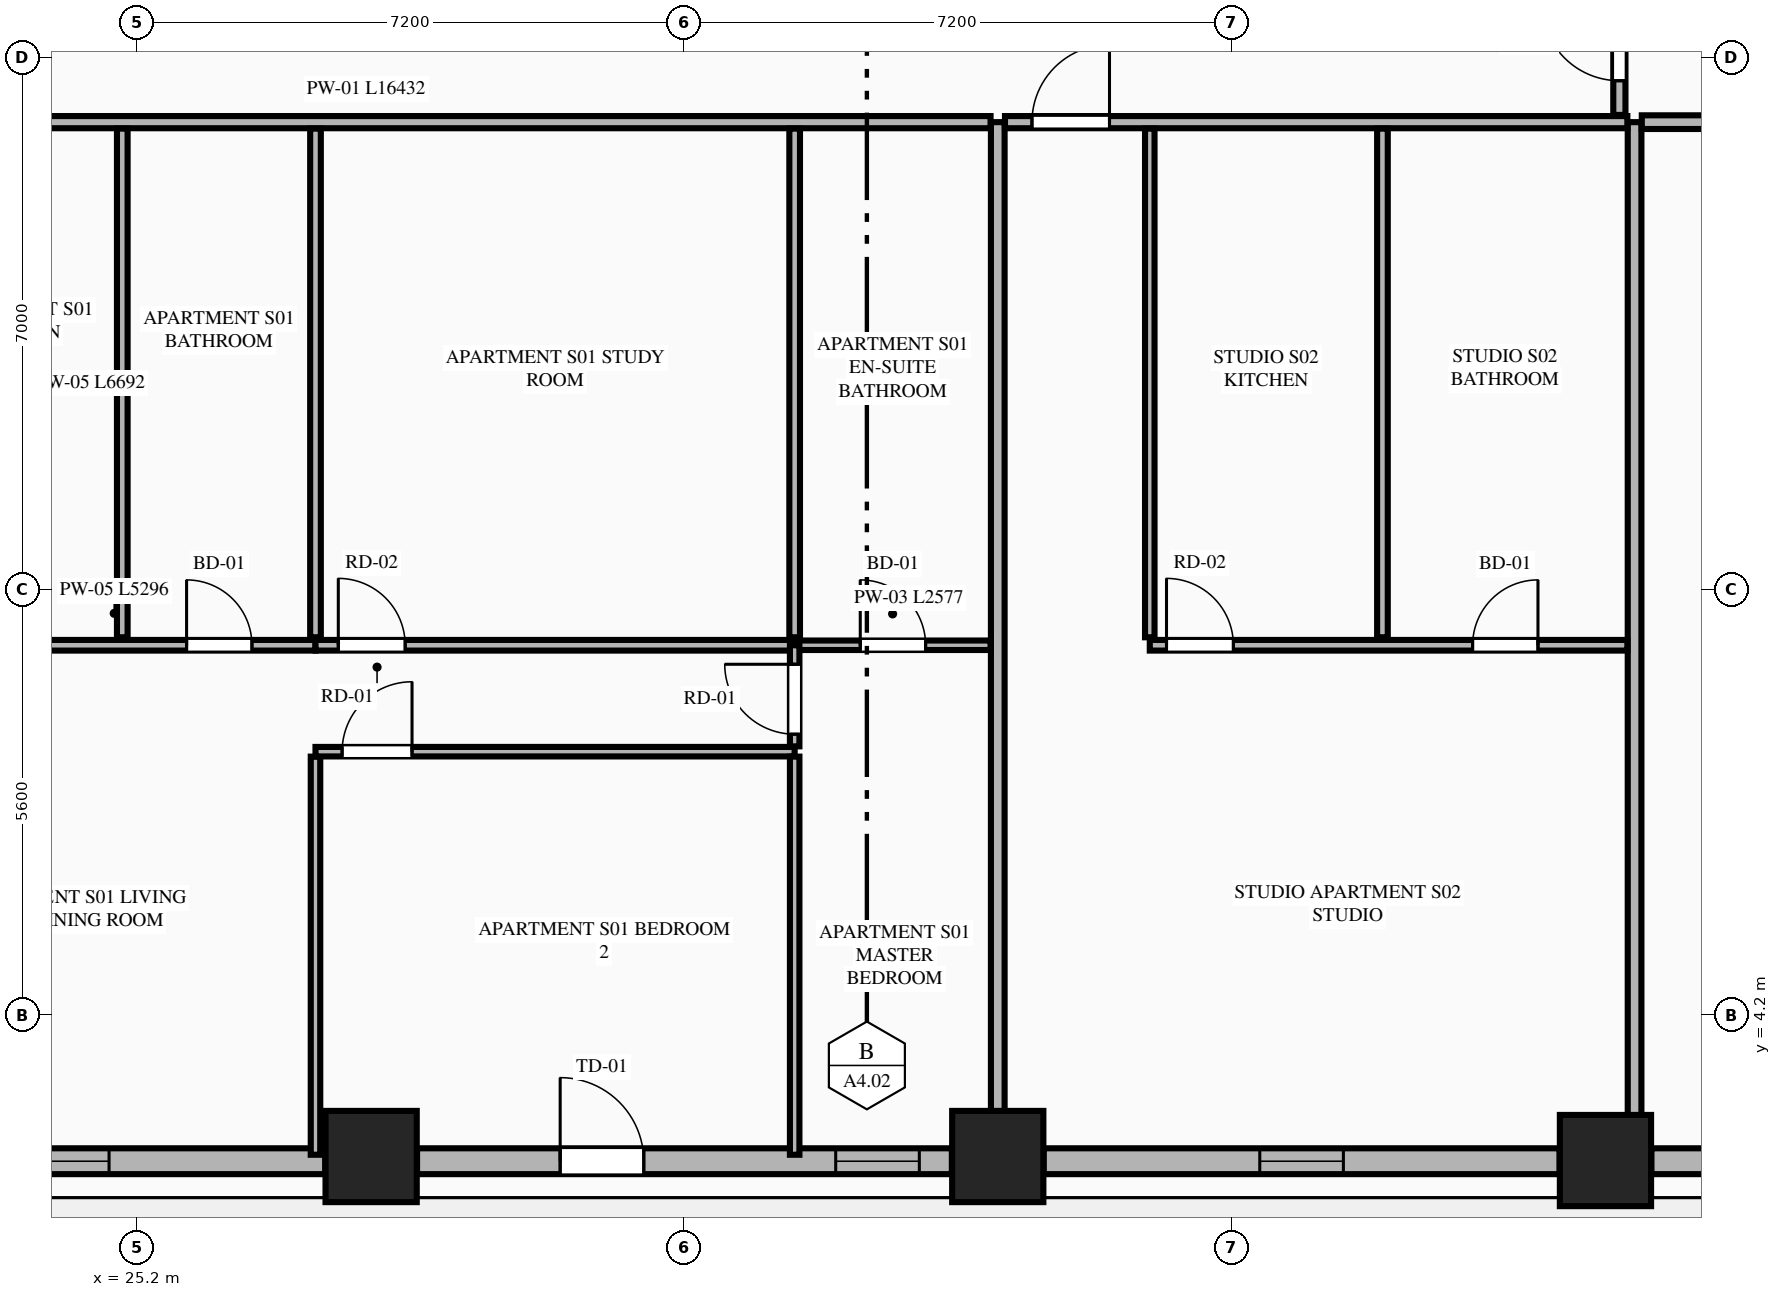
"""IFC4 building model, lengths in metres.
Left out: names, types, materials, properties, quantities, classifications, styles, units other than length and angle.
Written with IfcOpenShell. Run it as: python <this file> out.ifc"""

import sys

from ifc_helpers import new_model, si_unit, direction, frame, frame_2d, origin, origin_2d, place, context, subcontext, project, spatial, rectangle, extrude, element, fill, save


model = new_model("IFC4")
c1 = context("Model", 3, precision=1e-05, world=origin(), true_north=direction((0.0, 1.0)))
c2 = subcontext(c1, "Body", "Model", "MODEL_VIEW")
j1 = project(units=[si_unit("LENGTHUNIT", "METRE"), si_unit("PLANEANGLEUNIT", "RADIAN")], contexts=[c1])
p1 = place(None, origin())
s1 = spatial("IfcSite", under=j1, at=p1, CompositionType="ELEMENT")
p2 = place(p1, origin())
s2 = spatial("IfcBuilding", under=s1, at=p2, CompositionType="ELEMENT")
p3 = place(p2, frame((0.0, 0.0, 53.3)))
s3 = spatial("IfcBuildingStorey", under=s2, at=p3, CompositionType="ELEMENT", Elevation=53.3)
for number, where, z_axis, x_axis in (
    (1, (28.278, 2.342, 0.0), (0.0, 0.0, 1.0), (1.0, 0.0, 0.0)),
    (2, (36.522, 2.342, 0.0), (0.0, 0.0, 1.0), (1.0, 0.0, 0.0)),
    (3, (44.517, 2.289, 0.0), (0.0, 0.0, 1.0), (1.0, 0.0, 0.0)),
):
    element("IfcColumn", number, at=place(p3, frame(where, z_axis=z_axis, x_axis=x_axis)), inside=s3, PredefinedType="COLUMN", context=c2, shape_type="SweptSolid", body=[
        extrude(rectangle(XDim=1.2, YDim=1.2, at=origin_2d()), origin(), (0.0, 0.0, 1.0), 3.55),
    ])
p4 = place(p3, frame((20.887, 2.28, 0.0), z_axis=(0.0, 0.0, 1.0), x_axis=(1.0, 0.0, 0.0)))
e4 = element("IfcWall", 4, at=p4, inside=s3, PredefinedType="STANDARD", context=c2, shape_type="SweptSolid", body=[
    extrude(rectangle(XDim=6.787, YDim=0.34, at=frame_2d((3.394, 0.0))), origin(), (0.0, 0.0, 1.0), 2.787),
])
p5 = place(p4, frame((2.843, 0.0, 0.75)))
e5 = element("IfcOpeningElement", 5, at=p5, cuts=e4, PredefinedType="OPENING", context=c2, shape_type="SweptSolid", body=[
    extrude(rectangle(XDim=1.1, YDim=1.887, at=frame_2d((0.55, 0.943))), frame((0.0, 0.18, 0.0), z_axis=(0.0, -1.0, 0.0), x_axis=(1.0, 0.0, 0.0)), (0.0, 0.0, 1.0), 0.36),
])
p6 = place(p3, frame((28.882, 2.28, 0.0), z_axis=(0.0, 0.0, 1.0), x_axis=(1.0, 0.0, 0.0)))
e6 = element("IfcWall", 6, at=p6, inside=s3, PredefinedType="STANDARD", context=c2, shape_type="SweptSolid", body=[
    extrude(rectangle(XDim=7.036, YDim=0.34, at=frame_2d((3.518, 0.0))), origin(), (0.0, 0.0, 1.0), 2.787),
])
p7 = place(p6, frame((1.883, 0.0, 0.0)))
e7 = element("IfcOpeningElement", 7, at=p7, cuts=e6, PredefinedType="OPENING", context=c2, shape_type="SweptSolid", body=[
    extrude(rectangle(XDim=1.1, YDim=2.25, at=frame_2d((0.55, 1.125))), frame((0.0, 0.18, 0.0), z_axis=(0.0, -1.0, 0.0), x_axis=(1.0, 0.0, 0.0)), (0.0, 0.0, 1.0), 0.36),
])
p8 = place(p6, frame((5.508, 0.0, 0.75)))
e8 = element("IfcOpeningElement", 8, at=p8, cuts=e6, PredefinedType="OPENING", context=c2, shape_type="SweptSolid", body=[
    extrude(rectangle(XDim=1.1, YDim=1.887, at=frame_2d((0.55, 0.943))), frame((0.0, 0.18, 0.0), z_axis=(0.0, -1.0, 0.0), x_axis=(1.0, 0.0, 0.0)), (0.0, 0.0, 1.0), 0.36),
])
p9 = place(p3, frame((37.126, 2.28, 0.0), z_axis=(0.0, 0.0, 1.0), x_axis=(1.0, 0.0, 0.0)))
e9 = element("IfcWall", 9, at=p9, inside=s3, PredefinedType="STANDARD", context=c2, shape_type="SweptSolid", body=[
    extrude(rectangle(XDim=6.787, YDim=0.34, at=frame_2d((3.394, 0.0))), origin(), (0.0, 0.0, 1.0), 2.787),
])
p10 = place(p9, frame((2.843, 0.0, 0.75)))
e10 = element("IfcOpeningElement", 10, at=p10, cuts=e9, PredefinedType="OPENING", context=c2, shape_type="SweptSolid", body=[
    extrude(rectangle(XDim=1.1, YDim=1.887, at=frame_2d((0.55, 0.943))), frame((0.0, 0.18, 0.0), z_axis=(0.0, -1.0, 0.0), x_axis=(1.0, 0.0, 0.0)), (0.0, 0.0, 1.0), 0.36),
])
p11 = place(p3, frame((45.121, 2.28, 0.0), z_axis=(0.0, 0.0, 1.0), x_axis=(1.0, 0.0, 0.0)))
e11 = element("IfcWall", 11, at=p11, inside=s3, PredefinedType="STANDARD", context=c2, shape_type="SweptSolid", body=[
    extrude(rectangle(XDim=1.245, YDim=0.34, at=frame_2d((0.623, 0.0))), origin(), (0.0, 0.0, 1.0), 3.33),
])
p12 = place(p3, frame((36.522, 2.455, 0.0), z_axis=(0.0, 0.0, 1.0), x_axis=(0.0, 1.0, 0.0)))
e12 = element("IfcWall", 12, at=p12, inside=s3, PredefinedType="PARTITIONING", context=c2, shape_type="SweptSolid", body=[
    extrude(rectangle(XDim=13.495, YDim=0.18, at=frame_2d((6.748, 0.0))), origin(), (0.0, 0.0, 1.0), 2.637),
])
p13 = place(p3, frame((44.9, 2.455, 0.0), z_axis=(0.0, 0.0, 1.0), x_axis=(0.0, 1.0, 0.0)))
e13 = element("IfcWall", 13, at=p13, inside=s3, PredefinedType="PARTITIONING", context=c2, shape_type="SweptSolid", body=[
    extrude(rectangle(XDim=13.495, YDim=0.18, at=frame_2d((6.748, 0.0))), origin(), (0.0, 0.0, 1.0), 3.33),
])
p14 = place(p3, frame((19.995, 15.95, 0.0), z_axis=(0.0, 0.0, 1.0), x_axis=(1.0, 0.0, 0.0)))
e14 = element("IfcWall", 14, at=p14, inside=s3, PredefinedType="PARTITIONING", context=c2, shape_type="SweptSolid", body=[
    extrude(rectangle(XDim=16.432, YDim=0.16, at=frame_2d((8.216, 0.0))), origin(), (0.0, 0.0, 1.0), 3.33),
])
p15 = place(p14, frame((0.705, 0.0, 0.0)))
e15 = element("IfcOpeningElement", 15, at=p15, cuts=e14, PredefinedType="OPENING", context=c2, shape_type="SweptSolid", body=[
    extrude(rectangle(XDim=1.35, YDim=2.35, at=frame_2d((0.675, 1.175))), frame((0.0, 0.09, 0.0), z_axis=(0.0, -1.0, 0.0), x_axis=(1.0, 0.0, 0.0)), (0.0, 0.0, 1.0), 0.18),
])
p16 = place(p3, frame((22.25, 9.068, 0.0), z_axis=(0.0, 0.0, 1.0), x_axis=(1.0, 0.0, 0.0)))
e16 = element("IfcWall", 16, at=p16, inside=s3, PredefinedType="PLUMBINGWALL", context=c2, shape_type="SweptSolid", body=[
    extrude(rectangle(XDim=5.296, YDim=0.14, at=frame_2d((2.648, 0.0))), origin(), (0.0, 0.0, 1.0), 3.33),
])
p17 = place(p16, frame((3.6, 0.0, 0.0)))
e17 = element("IfcOpeningElement", 17, at=p17, cuts=e16, PredefinedType="OPENING", context=c2, shape_type="SweptSolid", body=[
    extrude(rectangle(XDim=0.86, YDim=2.1, at=frame_2d((0.43, 1.05))), frame((0.0, 0.08, 0.0), z_axis=(0.0, -1.0, 0.0), x_axis=(1.0, 0.0, 0.0)), (0.0, 0.0, 1.0), 0.16),
])
p18 = place(p16, frame((0.26, 0.0, 0.0)))
e18 = element("IfcOpeningElement", 18, at=p18, cuts=e16, PredefinedType="OPENING", context=c2, shape_type="SweptSolid", body=[
    extrude(rectangle(XDim=0.88, YDim=2.15, at=frame_2d((0.44, 1.075))), frame((0.0, 0.08, 0.0), z_axis=(0.0, -1.0, 0.0), x_axis=(1.0, 0.0, 0.0)), (0.0, 0.0, 1.0), 0.16),
])
p19 = place(p3, frame((27.546, 9.068, 0.0), z_axis=(0.0, 0.0, 1.0), x_axis=(1.0, 0.0, 0.0)))
e19 = element("IfcWall", 19, at=p19, inside=s3, PredefinedType="PLUMBINGWALL", context=c2, shape_type="SweptSolid", body=[
    extrude(rectangle(XDim=6.304, YDim=0.14, at=frame_2d((3.152, 0.0))), origin(), (0.0, 0.0, 1.0), 3.33),
])
p20 = place(p19, frame((0.3, 0.0, 0.0)))
e20 = element("IfcOpeningElement", 20, at=p20, cuts=e19, PredefinedType="OPENING", context=c2, shape_type="SweptSolid", body=[
    extrude(rectangle(XDim=0.88, YDim=2.15, at=frame_2d((0.44, 1.075))), frame((0.0, 0.08, 0.0), z_axis=(0.0, -1.0, 0.0), x_axis=(1.0, 0.0, 0.0)), (0.0, 0.0, 1.0), 0.16),
])
p21 = place(p3, frame((33.85, 9.068, 0.0), z_axis=(0.0, 0.0, 1.0), x_axis=(1.0, 0.0, 0.0)))
e21 = element("IfcWall", 21, at=p21, inside=s3, PredefinedType="PARTITIONING", context=c2, shape_type="SweptSolid", body=[
    extrude(rectangle(XDim=2.577, YDim=0.125, at=frame_2d((1.289, 0.0))), origin(), (0.0, 0.0, 1.0), 3.33),
])
p22 = place(p21, frame((0.863, 0.0, 0.0)))
e22 = element("IfcOpeningElement", 22, at=p22, cuts=e21, PredefinedType="OPENING", context=c2, shape_type="SweptSolid", body=[
    extrude(rectangle(XDim=0.86, YDim=2.1, at=frame_2d((0.43, 1.05))), frame((0.0, 0.073, 0.0), z_axis=(0.0, -1.0, 0.0), x_axis=(1.0, 0.0, 0.0)), (0.0, 0.0, 1.0), 0.145),
])
p23 = place(p3, frame((25.004, 9.173, 0.0), z_axis=(0.0, 0.0, 1.0), x_axis=(0.0, 1.0, 0.0)))
e23 = element("IfcWall", 23, at=p23, inside=s3, PredefinedType="PLUMBINGWALL", context=c2, shape_type="SweptSolid", body=[
    extrude(rectangle(XDim=6.692, YDim=0.14, at=frame_2d((3.346, 0.0))), origin(), (0.0, 0.0, 1.0), 3.33),
])
p24 = place(p3, frame((27.546, 2.365, 0.0), z_axis=(0.0, 0.0, 1.0), x_axis=(0.0, 1.0, 0.0)))
e24 = element("IfcWall", 24, at=p24, inside=s3, PredefinedType="PARTITIONING", context=c2, shape_type="SweptSolid", body=[
    extrude(rectangle(XDim=5.238, YDim=0.125, at=frame_2d((2.619, 0.0))), origin(), (0.0, 0.0, 1.0), 3.33),
])
p25 = place(p3, frame((27.546, 7.668, 0.0), z_axis=(0.0, 0.0, 1.0), x_axis=(1.0, 0.0, 0.0)))
e25 = element("IfcWall", 25, at=p25, inside=s3, PredefinedType="PARTITIONING", context=c2, shape_type="SweptSolid", body=[
    extrude(rectangle(XDim=6.304, YDim=0.125, at=frame_2d((3.152, 0.0))), origin(), (0.0, 0.0, 1.0), 3.33),
])
p26 = place(p25, frame((0.35, 0.0, 0.0)))
e26 = element("IfcOpeningElement", 26, at=p26, cuts=e25, PredefinedType="OPENING", context=c2, shape_type="SweptSolid", body=[
    extrude(rectangle(XDim=0.92, YDim=2.15, at=frame_2d((0.46, 1.075))), frame((0.0, 0.073, 0.0), z_axis=(0.0, -1.0, 0.0), x_axis=(1.0, 0.0, 0.0)), (0.0, 0.0, 1.0), 0.145),
])
p27 = place(p3, frame((33.85, 7.738, 0.0), z_axis=(0.0, 0.0, 1.0), x_axis=(0.0, 1.0, 0.0)))
e27 = element("IfcWall", 27, at=p27, inside=s3, PredefinedType="PARTITIONING", context=c2, shape_type="SweptSolid", body=[
    extrude(rectangle(XDim=1.33, YDim=0.125, at=frame_2d((0.665, 0.0))), origin(), (0.0, 0.0, 1.0), 3.33),
])
p28 = place(p27, frame((0.16, 0.0, 0.0)))
e28 = element("IfcOpeningElement", 28, at=p28, cuts=e27, PredefinedType="OPENING", context=c2, shape_type="SweptSolid", body=[
    extrude(rectangle(XDim=0.92, YDim=2.15, at=frame_2d((0.46, 1.075))), frame((0.0, 0.073, 0.0), z_axis=(0.0, -1.0, 0.0), x_axis=(1.0, 0.0, 0.0)), (0.0, 0.0, 1.0), 0.145),
])
for number, where, z_axis, x_axis in (
    (29, (27.546, 9.173, 0.0), (0.0, 0.0, 1.0), (0.0, 1.0, 0.0)),
    (30, (33.85, 9.173, 0.0), (0.0, 0.0, 1.0), (0.0, 1.0, 0.0)),
):
    element("IfcWall", number, at=place(p3, frame(where, z_axis=z_axis, x_axis=x_axis)), inside=s3, PredefinedType="PLUMBINGWALL", context=c2, shape_type="SweptSolid", body=[
        extrude(rectangle(XDim=6.692, YDim=0.14, at=frame_2d((3.346, 0.0))), origin(), (0.0, 0.0, 1.0), 3.33),
    ])
p29 = place(p3, frame((33.85, 2.365, 0.0), z_axis=(0.0, 0.0, 1.0), x_axis=(0.0, 1.0, 0.0)))
e31 = element("IfcWall", 31, at=p29, inside=s3, PredefinedType="PARTITIONING", context=c2, shape_type="SweptSolid", body=[
    extrude(rectangle(XDim=5.238, YDim=0.125, at=frame_2d((2.619, 0.0))), origin(), (0.0, 0.0, 1.0), 3.33),
])
p30 = place(p3, frame((36.617, 15.95, 0.0), z_axis=(0.0, 0.0, 1.0), x_axis=(1.0, 0.0, 0.0)))
e32 = element("IfcWall", 32, at=p30, inside=s3, PredefinedType="PARTITIONING", context=c2, shape_type="SweptSolid", body=[
    extrude(rectangle(XDim=8.188, YDim=0.16, at=frame_2d((4.094, 0.0))), origin(), (0.0, 0.0, 1.0), 3.33),
])
p31 = place(p30, frame((0.355, 0.0, 0.0)))
e33 = element("IfcOpeningElement", 33, at=p31, cuts=e32, PredefinedType="OPENING", context=c2, shape_type="SweptSolid", body=[
    extrude(rectangle(XDim=1.02, YDim=2.25, at=frame_2d((0.51, 1.125))), frame((0.0, 0.09, 0.0), z_axis=(0.0, -1.0, 0.0), x_axis=(1.0, 0.0, 0.0)), (0.0, 0.0, 1.0), 0.18),
])
p32 = place(p3, frame((38.522, 9.173, 0.0), z_axis=(0.0, 0.0, 1.0), x_axis=(0.0, 1.0, 0.0)))
e34 = element("IfcWall", 34, at=p32, inside=s3, PredefinedType="PARTITIONING", context=c2, shape_type="SweptSolid", body=[
    extrude(rectangle(XDim=6.692, YDim=0.125, at=frame_2d((3.346, 0.0))), origin(), (0.0, 0.0, 1.0), 3.33),
])
p33 = place(p3, frame((38.522, 9.068, 0.0), z_axis=(0.0, 0.0, 1.0), x_axis=(1.0, 0.0, 0.0)))
e35 = element("IfcWall", 35, at=p33, inside=s3, PredefinedType="PLUMBINGWALL", context=c2, shape_type="SweptSolid", body=[
    extrude(rectangle(XDim=6.283, YDim=0.14, at=frame_2d((3.142, 0.0))), origin(), (0.0, 0.0, 1.0), 3.33),
])
p34 = place(p33, frame((4.247, 0.0, 0.0)))
e36 = element("IfcOpeningElement", 36, at=p34, cuts=e35, PredefinedType="OPENING", context=c2, shape_type="SweptSolid", body=[
    extrude(rectangle(XDim=0.86, YDim=2.1, at=frame_2d((0.43, 1.05))), frame((0.0, 0.08, 0.0), z_axis=(0.0, -1.0, 0.0), x_axis=(1.0, 0.0, 0.0)), (0.0, 0.0, 1.0), 0.16),
])
p35 = place(p33, frame((0.22, 0.0, 0.0)))
e37 = element("IfcOpeningElement", 37, at=p35, cuts=e35, PredefinedType="OPENING", context=c2, shape_type="SweptSolid", body=[
    extrude(rectangle(XDim=0.88, YDim=2.15, at=frame_2d((0.44, 1.075))), frame((0.0, 0.08, 0.0), z_axis=(0.0, -1.0, 0.0), x_axis=(1.0, 0.0, 0.0)), (0.0, 0.0, 1.0), 0.16),
])
p36 = place(p3, frame((41.583, 9.173, 0.0), z_axis=(0.0, 0.0, 1.0), x_axis=(0.0, 1.0, 0.0)))
e38 = element("IfcWall", 38, at=p36, inside=s3, PredefinedType="PLUMBINGWALL", context=c2, shape_type="SweptSolid", body=[
    extrude(rectangle(XDim=6.692, YDim=0.14, at=frame_2d((3.346, 0.0))), origin(), (0.0, 0.0, 1.0), 3.33),
])
p37 = place(p3, frame((44.995, 15.95, 0.0), z_axis=(0.0, 0.0, 1.0), x_axis=(1.0, 0.0, 0.0)))
e39 = element("IfcWall", 39, at=p37, inside=s3, PredefinedType="PARTITIONING", context=c2, shape_type="SweptSolid", body=[
    extrude(rectangle(XDim=9.241, YDim=0.18, at=frame_2d((4.621, 0.0))), origin(), (0.0, 0.0, 1.0), 3.33),
])
p38 = place(p3, frame((44.7, 16.045, 0.0), z_axis=(0.0, 0.0, 1.0), x_axis=(0.0, 1.0, 0.0)))
e40 = element("IfcWall", 40, at=p38, inside=s3, PredefinedType="PARTITIONING", context=c2, shape_type="SweptSolid", body=[
    extrude(rectangle(XDim=19.71, YDim=0.16, at=frame_2d((9.855, 0.0))), origin(), (0.0, 0.0, 1.0), 3.33),
])
p39 = place(p38, frame((0.45, 0.0, 0.0)))
e41 = element("IfcOpeningElement", 41, at=p39, cuts=e40, PredefinedType="OPENING", context=c2, shape_type="SweptSolid", body=[
    extrude(rectangle(XDim=1.02, YDim=2.25, at=frame_2d((0.51, 1.125))), frame((0.0, 0.09, 0.0), z_axis=(0.0, -1.0, 0.0), x_axis=(1.0, 0.0, 0.0)), (0.0, 0.0, 1.0), 0.18),
])
p40 = place(p5, origin())
e42 = element("IfcWindow", 42, at=p40, inside=s3, PartitioningType="SINGLE_PANEL", PredefinedType="WINDOW", context=c2, shape_type="SweptSolid", body=[
    extrude(rectangle(XDim=1.1, YDim=1.887, at=frame_2d((0.55, 0.943))), frame((0.0, 0.03, 0.0), z_axis=(0.0, -1.0, 0.0), x_axis=(1.0, 0.0, 0.0)), (0.0, 0.0, 1.0), 0.06),
])
fill(e5, e42)
p41 = place(p7, origin())
e43 = element("IfcDoor", 43, at=p41, inside=s3, OperationType="SINGLE_SWING_LEFT", PredefinedType="DOOR", context=c2, shape_type="SweptSolid", body=[
    extrude(rectangle(XDim=1.1, YDim=2.25, at=frame_2d((0.55, 1.125))), frame((0.0, 0.025, 0.0), z_axis=(0.0, -1.0, 0.0), x_axis=(1.0, 0.0, 0.0)), (0.0, 0.0, 1.0), 0.05),
])
fill(e7, e43)
p42 = place(p10, origin())
e44 = element("IfcWindow", 44, at=p42, inside=s3, PartitioningType="SINGLE_PANEL", PredefinedType="WINDOW", context=c2, shape_type="SweptSolid", body=[
    extrude(rectangle(XDim=1.1, YDim=1.887, at=frame_2d((0.55, 0.943))), frame((0.0, 0.03, 0.0), z_axis=(0.0, -1.0, 0.0), x_axis=(1.0, 0.0, 0.0)), (0.0, 0.0, 1.0), 0.06),
])
fill(e10, e44)
p43 = place(p17, origin())
e45 = element("IfcDoor", 45, at=p43, inside=s3, OperationType="SINGLE_SWING_LEFT", PredefinedType="DOOR", context=c2, shape_type="SweptSolid", body=[
    extrude(rectangle(XDim=0.86, YDim=2.1, at=frame_2d((0.43, 1.05))), frame((0.0, 0.025, 0.0), z_axis=(0.0, -1.0, 0.0), x_axis=(1.0, 0.0, 0.0)), (0.0, 0.0, 1.0), 0.05),
])
fill(e17, e45)
p44 = place(p22, origin())
e46 = element("IfcDoor", 46, at=p44, inside=s3, OperationType="SINGLE_SWING_LEFT", PredefinedType="DOOR", context=c2, shape_type="SweptSolid", body=[
    extrude(rectangle(XDim=0.86, YDim=2.1, at=frame_2d((0.43, 1.05))), frame((0.0, 0.025, 0.0), z_axis=(0.0, -1.0, 0.0), x_axis=(1.0, 0.0, 0.0)), (0.0, 0.0, 1.0), 0.05),
])
fill(e22, e46)
p45 = place(p20, origin())
e47 = element("IfcDoor", 47, at=p45, inside=s3, OperationType="SINGLE_SWING_LEFT", PredefinedType="DOOR", context=c2, shape_type="SweptSolid", body=[
    extrude(rectangle(XDim=0.88, YDim=2.15, at=frame_2d((0.44, 1.075))), frame((0.0, 0.025, 0.0), z_axis=(0.0, -1.0, 0.0), x_axis=(1.0, 0.0, 0.0)), (0.0, 0.0, 1.0), 0.05),
])
fill(e20, e47)
p46 = place(p26, origin())
e48 = element("IfcDoor", 48, at=p46, inside=s3, OperationType="SINGLE_SWING_RIGHT", PredefinedType="DOOR", context=c2, shape_type="SweptSolid", body=[
    extrude(rectangle(XDim=0.92, YDim=2.15, at=frame_2d((0.46, 1.075))), frame((0.0, 0.025, 0.0), z_axis=(0.0, -1.0, 0.0), x_axis=(1.0, 0.0, 0.0)), (0.0, 0.0, 1.0), 0.05),
])
fill(e26, e48)
p47 = place(p28, origin())
e49 = element("IfcDoor", 49, at=p47, inside=s3, OperationType="SINGLE_SWING_RIGHT", PredefinedType="DOOR", context=c2, shape_type="SweptSolid", body=[
    extrude(rectangle(XDim=0.92, YDim=2.15, at=frame_2d((0.46, 1.075))), frame((0.0, 0.025, 0.0), z_axis=(0.0, -1.0, 0.0), x_axis=(1.0, 0.0, 0.0)), (0.0, 0.0, 1.0), 0.05),
])
fill(e28, e49)
p48 = place(p34, origin())
e50 = element("IfcDoor", 50, at=p48, inside=s3, OperationType="SINGLE_SWING_RIGHT", PredefinedType="DOOR", context=c2, shape_type="SweptSolid", body=[
    extrude(rectangle(XDim=0.86, YDim=2.1, at=frame_2d((0.43, 1.05))), frame((0.0, 0.025, 0.0), z_axis=(0.0, -1.0, 0.0), x_axis=(1.0, 0.0, 0.0)), (0.0, 0.0, 1.0), 0.05),
])
fill(e36, e50)
p49 = place(p31, origin())
e51 = element("IfcDoor", 51, at=p49, inside=s3, OperationType="SINGLE_SWING_RIGHT", PredefinedType="DOOR", context=c2, shape_type="SweptSolid", body=[
    extrude(rectangle(XDim=1.02, YDim=2.25, at=frame_2d((0.51, 1.125))), frame((0.0, 0.025, 0.0), z_axis=(0.0, -1.0, 0.0), x_axis=(1.0, 0.0, 0.0)), (0.0, 0.0, 1.0), 0.05),
])
fill(e33, e51)
p50 = place(p35, origin())
e52 = element("IfcDoor", 52, at=p50, inside=s3, OperationType="SINGLE_SWING_LEFT", PredefinedType="DOOR", context=c2, shape_type="SweptSolid", body=[
    extrude(rectangle(XDim=0.88, YDim=2.15, at=frame_2d((0.44, 1.075))), frame((0.0, 0.025, 0.0), z_axis=(0.0, -1.0, 0.0), x_axis=(1.0, 0.0, 0.0)), (0.0, 0.0, 1.0), 0.05),
])
fill(e37, e52)
p51 = place(p39, origin())
e53 = element("IfcDoor", 53, at=p51, inside=s3, OperationType="SINGLE_SWING_RIGHT", PredefinedType="DOOR", context=c2, shape_type="SweptSolid", body=[
    extrude(rectangle(XDim=1.02, YDim=2.25, at=frame_2d((0.51, 1.125))), frame((0.0, 0.025, 0.0), z_axis=(0.0, -1.0, 0.0), x_axis=(1.0, 0.0, 0.0)), (0.0, 0.0, 1.0), 0.05),
])
fill(e41, e53)
p52 = place(p8, origin())
e54 = element("IfcWindow", 54, at=p52, inside=s3, PartitioningType="SINGLE_PANEL", PredefinedType="WINDOW", context=c2, shape_type="SweptSolid", body=[
    extrude(rectangle(XDim=1.1, YDim=1.887, at=frame_2d((0.55, 0.943))), frame((0.0, 0.03, 0.0), z_axis=(0.0, -1.0, 0.0), x_axis=(1.0, 0.0, 0.0)), (0.0, 0.0, 1.0), 0.06),
])
fill(e8, e54)
save(model, sys.argv[1])
